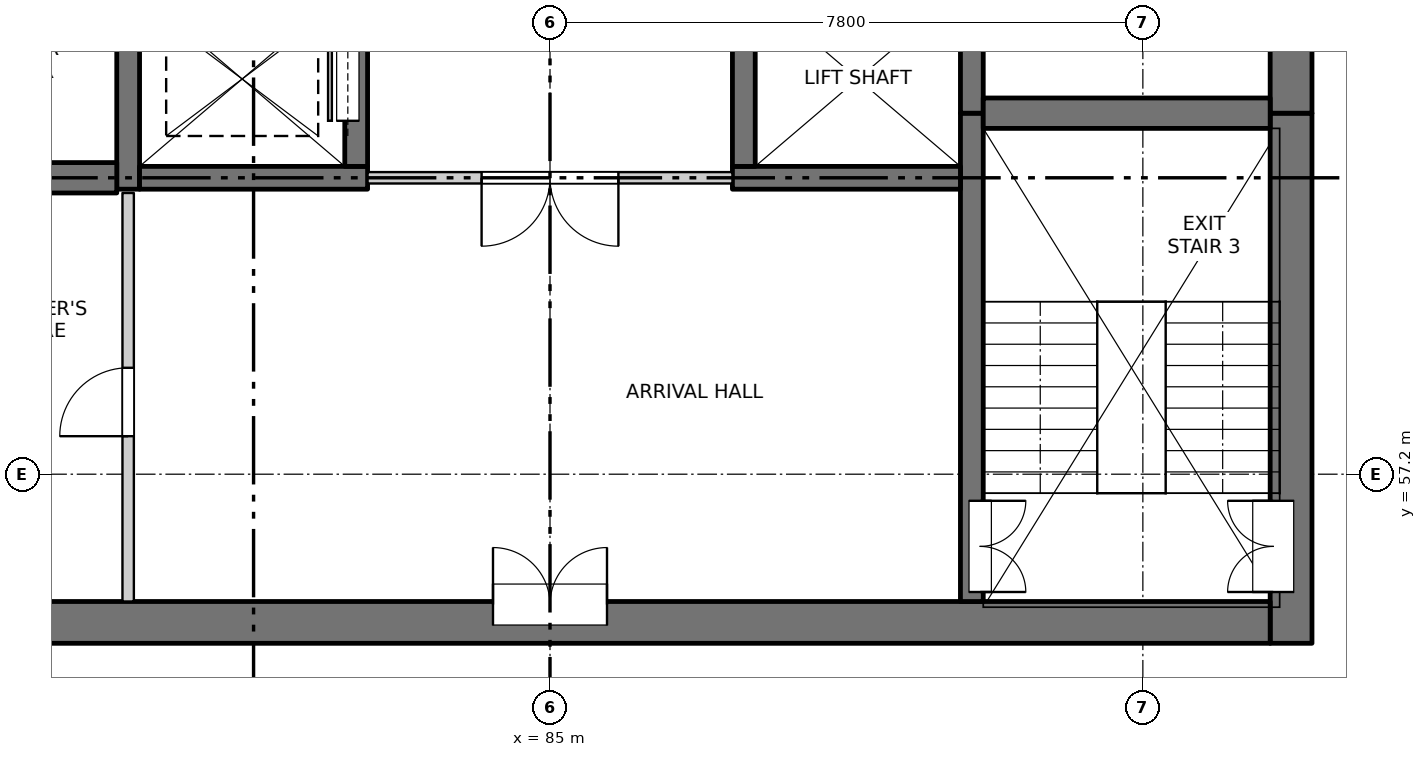
"""IFC4 building model, lengths in metres.
Left out: names, types, materials, properties, quantities, classifications, styles, units other than length and angle.
Written with IfcOpenShell. Run it as: python <this file> out.ifc"""

import sys

from ifc_helpers import new_model, si_unit, direction, frame, frame_2d, origin, place, context, subcontext, project, spatial, rectangle, extrude, element, fill, save


model = new_model("IFC4")
c1 = context("Model", 3, precision=1e-05, world=origin(), true_north=direction((0.0, 1.0)))
c2 = subcontext(c1, "Body", "Model", "MODEL_VIEW")
j1 = project(units=[si_unit("LENGTHUNIT", "METRE"), si_unit("PLANEANGLEUNIT", "RADIAN")], contexts=[c1])
p1 = place(None, origin())
s1 = spatial("IfcSite", under=j1, at=p1, CompositionType="ELEMENT")
p2 = place(p1, origin())
s2 = spatial("IfcBuilding", under=s1, at=p2, CompositionType="ELEMENT")
p3 = place(p2, frame((0.0, 0.0, 99.9)))
s3 = spatial("IfcBuildingStorey", under=s2, at=p3, CompositionType="ELEMENT", Elevation=99.9)
p4 = place(p3, frame((94.75, 54.975, -0.3), z_axis=(0.0, 0.0, 1.0), x_axis=(0.0, 1.0, 0.0)))
e1 = element("IfcWall", 1, at=p4, inside=s3, PredefinedType="SOLIDWALL", context=c2, shape_type="SweptSolid", body=[
    extrude(rectangle(XDim=6.975, YDim=0.55, at=frame_2d((3.487, 0.0))), origin(), (0.0, 0.0, 1.0), 3.45),
])
p5 = place(p4, frame((0.675, 0.0, 0.3)))
e2 = element("IfcOpeningElement", 2, at=p5, cuts=e1, PredefinedType="OPENING", context=c2, shape_type="SweptSolid", body=[
    extrude(rectangle(XDim=1.2, YDim=2.1, at=frame_2d((0.6, 1.05))), frame((0.0, 0.285, 0.0), z_axis=(0.0, -1.0, 0.0), x_axis=(1.0, 0.0, 0.0)), (0.0, 0.0, 1.0), 0.57),
])
p6 = place(p3, frame((94.75, 61.95, -0.3), z_axis=(0.0, 0.0, 1.0), x_axis=(0.0, 1.0, 0.0)))
e3 = element("IfcWall", 3, at=p6, inside=s3, PredefinedType="SOLIDWALL", context=c2, shape_type="SweptSolid", body=[
    extrude(rectangle(XDim=15.35, YDim=0.55, at=frame_2d((7.675, 0.0))), origin(), (0.0, 0.0, 1.0), 3.45),
])
p7 = place(p6, frame((0.925, 0.0, 0.3)))
e4 = element("IfcOpeningElement", 4, at=p7, cuts=e3, PredefinedType="OPENING", context=c2, shape_type="SweptSolid", body=[
    extrude(rectangle(XDim=0.9, YDim=2.1, at=frame_2d((0.45, 1.05))), frame((0.0, 0.285, 0.0), z_axis=(0.0, -1.0, 0.0), x_axis=(1.0, 0.0, 0.0)), (0.0, 0.0, 1.0), 0.57),
])
p8 = place(p6, frame((5.15, 0.0, 0.3)))
e5 = element("IfcOpeningElement", 5, at=p8, cuts=e3, PredefinedType="OPENING", context=c2, shape_type="SweptSolid", body=[
    extrude(rectangle(XDim=0.9, YDim=2.1, at=frame_2d((0.45, 1.05))), frame((0.0, 0.285, 0.0), z_axis=(0.0, -1.0, 0.0), x_axis=(1.0, 0.0, 0.0)), (0.0, 0.0, 1.0), 0.57),
])
p9 = place(p6, frame((9.65, 0.0, 0.3)))
e6 = element("IfcOpeningElement", 6, at=p9, cuts=e3, PredefinedType="OPENING", context=c2, shape_type="SweptSolid", body=[
    extrude(rectangle(XDim=0.9, YDim=2.1, at=frame_2d((0.45, 1.05))), frame((0.0, 0.285, 0.0), z_axis=(0.0, -1.0, 0.0), x_axis=(1.0, 0.0, 0.0)), (0.0, 0.0, 1.0), 0.57),
])
p10 = place(p6, frame((13.1, 0.0, 0.3)))
e7 = element("IfcOpeningElement", 7, at=p10, cuts=e3, PredefinedType="OPENING", context=c2, shape_type="SweptSolid", body=[
    extrude(rectangle(XDim=0.9, YDim=2.1, at=frame_2d((0.45, 1.05))), frame((0.0, 0.285, 0.0), z_axis=(0.0, -1.0, 0.0), x_axis=(1.0, 0.0, 0.0)), (0.0, 0.0, 1.0), 0.57),
])
p11 = place(p3, frame((75.525, 55.25, -0.3), z_axis=(0.0, 0.0, 1.0), x_axis=(1.0, 0.0, 0.0)))
e8 = element("IfcWall", 8, at=p11, inside=s3, PredefinedType="SOLIDWALL", context=c2, shape_type="SweptSolid", body=[
    extrude(rectangle(XDim=18.95, YDim=0.55, at=frame_2d((9.475, 0.0))), origin(), (0.0, 0.0, 1.0), 3.45),
])
p12 = place(p11, frame((8.725, 0.0, 0.3)))
e9 = element("IfcOpeningElement", 9, at=p12, cuts=e8, PredefinedType="OPENING", context=c2, shape_type="SweptSolid", body=[
    extrude(rectangle(XDim=1.5, YDim=2.1, at=frame_2d((0.75, 1.05))), frame((0.0, 0.285, 0.0), z_axis=(0.0, -1.0, 0.0), x_axis=(1.0, 0.0, 0.0)), (0.0, 0.0, 1.0), 0.57),
])
p13 = place(p3, frame((79.45, 60.95, -0.3), z_axis=(0.0, 0.0, 1.0), x_axis=(0.0, 1.0, 0.0)))
e10 = element("IfcWall", 10, at=p13, inside=s3, PredefinedType="SOLIDWALL", context=c2, shape_type="SweptSolid", body=[
    extrude(rectangle(XDim=16.35, YDim=0.3, at=frame_2d((8.175, 0.0))), origin(), (0.0, 0.0, 1.0), 3.45),
])
p14 = place(p3, frame((90.55, 55.525, -0.3), z_axis=(0.0, 0.0, 1.0), x_axis=(0.0, 1.0, 0.0)))
e11 = element("IfcWall", 11, at=p14, inside=s3, PredefinedType="SOLIDWALL", context=c2, shape_type="SweptSolid", body=[
    extrude(rectangle(XDim=6.425, YDim=0.3, at=frame_2d((3.212, 0.0))), origin(), (0.0, 0.0, 1.0), 3.45),
])
p15 = place(p14, frame((0.125, 0.0, 0.3)))
e12 = element("IfcOpeningElement", 12, at=p15, cuts=e11, PredefinedType="OPENING", context=c2, shape_type="SweptSolid", body=[
    extrude(rectangle(XDim=1.2, YDim=2.1, at=frame_2d((0.6, 1.05))), frame((0.0, 0.16, 0.0), z_axis=(0.0, -1.0, 0.0), x_axis=(1.0, 0.0, 0.0)), (0.0, 0.0, 1.0), 0.32),
])
p16 = place(p3, frame((90.55, 61.95, -0.3), z_axis=(0.0, 0.0, 1.0), x_axis=(0.0, 1.0, 0.0)))
e13 = element("IfcWall", 13, at=p16, inside=s3, PredefinedType="SOLIDWALL", context=c2, shape_type="SweptSolid", body=[
    extrude(rectangle(XDim=15.35, YDim=0.3, at=frame_2d((7.675, 0.0))), origin(), (0.0, 0.0, 1.0), 3.45),
])
p17 = place(p3, frame((79.6, 61.1, -0.3), z_axis=(0.0, 0.0, 1.0), x_axis=(1.0, 0.0, 0.0)))
e14 = element("IfcWall", 14, at=p17, inside=s3, PredefinedType="SOLIDWALL", context=c2, shape_type="SweptSolid", body=[
    extrude(rectangle(XDim=3.0, YDim=0.3, at=frame_2d((1.5, 0.0))), origin(), (0.0, 0.0, 1.0), 3.45),
])
p18 = place(p3, frame((82.45, 61.25, -0.3), z_axis=(0.0, 0.0, 1.0), x_axis=(0.0, 1.0, 0.0)))
e15 = element("IfcWall", 15, at=p18, inside=s3, PredefinedType="SOLIDWALL", context=c2, shape_type="SweptSolid", body=[
    extrude(rectangle(XDim=2.3, YDim=0.3, at=frame_2d((1.15, 0.0))), origin(), (0.0, 0.0, 1.0), 3.45),
])
p19 = place(p18, frame((0.6, 0.0, 0.3)))
e16 = element("IfcOpeningElement", 16, at=p19, cuts=e15, PredefinedType="OPENING", context=c2, shape_type="SweptSolid", body=[
    extrude(rectangle(XDim=1.1, YDim=2.1, at=frame_2d((0.55, 1.05))), frame((0.0, 0.16, 0.0), z_axis=(0.0, -1.0, 0.0), x_axis=(1.0, 0.0, 0.0)), (0.0, 0.0, 1.0), 0.32),
])
p20 = place(p3, frame((87.4, 61.1, -0.3), z_axis=(0.0, 0.0, 1.0), x_axis=(1.0, 0.0, 0.0)))
e17 = element("IfcWall", 17, at=p20, inside=s3, PredefinedType="SOLIDWALL", context=c2, shape_type="SweptSolid", body=[
    extrude(rectangle(XDim=3.0, YDim=0.3, at=frame_2d((1.5, 0.0))), origin(), (0.0, 0.0, 1.0), 3.45),
])
p21 = place(p3, frame((87.55, 61.25, -0.3), z_axis=(0.0, 0.0, 1.0), x_axis=(0.0, 1.0, 0.0)))
e18 = element("IfcWall", 18, at=p21, inside=s3, PredefinedType="SOLIDWALL", context=c2, shape_type="SweptSolid", body=[
    extrude(rectangle(XDim=2.3, YDim=0.3, at=frame_2d((1.15, 0.0))), origin(), (0.0, 0.0, 1.0), 3.45),
])
for number, where, z_axis, x_axis in (
    (19, (75.525, 61.1, -0.3), (0.0, 0.0, 1.0), (1.0, 0.0, 0.0)),
    (20, (90.7, 61.95, -0.3), (0.0, 0.0, 1.0), (1.0, 0.0, 0.0)),
):
    element("IfcWall", number, at=place(p3, frame(where, z_axis=z_axis, x_axis=x_axis)), inside=s3, PredefinedType="SOLIDWALL", context=c2, shape_type="SweptSolid", body=[
        extrude(rectangle(XDim=3.775, YDim=0.4, at=frame_2d((1.888, 0.0))), origin(), (0.0, 0.0, 1.0), 3.45),
    ])
p22 = place(p3, frame((82.6, 61.1, 0.0), z_axis=(0.0, 0.0, 1.0), x_axis=(1.0, 0.0, 0.0)))
e21 = element("IfcWall", 21, at=p22, inside=s3, PredefinedType="PARTITIONING", context=c2, shape_type="SweptSolid", body=[
    extrude(rectangle(XDim=4.8, YDim=0.15, at=frame_2d((2.4, 0.0))), origin(), (0.0, 0.0, 1.0), 3.15),
])
p23 = place(p22, frame((1.5, 0.0, 0.0)))
e22 = element("IfcOpeningElement", 22, at=p23, cuts=e21, PredefinedType="OPENING", context=c2, shape_type="SweptSolid", body=[
    extrude(rectangle(XDim=1.8, YDim=2.1, at=frame_2d((0.9, 1.05))), frame((0.0, 0.085, 0.0), z_axis=(0.0, -1.0, 0.0), x_axis=(1.0, 0.0, 0.0)), (0.0, 0.0, 1.0), 0.17),
])
p24 = place(p3, frame((79.45, 55.525, 0.0), z_axis=(0.0, 0.0, 1.0), x_axis=(0.0, 1.0, 0.0)))
e23 = element("IfcWall", 23, at=p24, inside=s3, PredefinedType="PARTITIONING", context=c2, shape_type="SweptSolid", body=[
    extrude(rectangle(XDim=5.375, YDim=0.15, at=frame_2d((2.688, 0.0))), origin(), (0.0, 0.0, 1.0), 3.15),
])
p25 = place(p24, frame((2.175, 0.0, 0.0)))
e24 = element("IfcOpeningElement", 24, at=p25, cuts=e23, PredefinedType="OPENING", context=c2, shape_type="SweptSolid", body=[
    extrude(rectangle(XDim=0.9, YDim=2.1, at=frame_2d((0.45, 1.05))), frame((0.0, 0.085, 0.0), z_axis=(0.0, -1.0, 0.0), x_axis=(1.0, 0.0, 0.0)), (0.0, 0.0, 1.0), 0.17),
])
p26 = place(p12, origin())
e25 = element("IfcDoor", 25, at=p26, inside=s3, OperationType="DOUBLE_DOOR_SINGLE_SWING", PredefinedType="DOOR", context=c2, shape_type="SweptSolid", body=[
    extrude(rectangle(XDim=1.5, YDim=2.1, at=frame_2d((0.75, 1.05))), frame((0.0, 0.26, 0.0), z_axis=(0.0, -1.0, 0.0), x_axis=(1.0, 0.0, 0.0)), (0.0, 0.0, 1.0), 0.05),
])
fill(e9, e25)
p27 = place(p15, origin())
e26 = element("IfcDoor", 26, at=p27, inside=s3, OperationType="DOUBLE_DOOR_SINGLE_SWING", PredefinedType="DOOR", context=c2, shape_type="SweptSolid", body=[
    extrude(rectangle(XDim=1.2, YDim=2.1, at=frame_2d((0.6, 1.05))), frame((0.0, -0.085, 0.0), z_axis=(0.0, -1.0, 0.0), x_axis=(1.0, 0.0, 0.0)), (0.0, 0.0, 1.0), 0.05),
])
fill(e12, e26)
p28 = place(p5, origin())
e27 = element("IfcDoor", 27, at=p28, inside=s3, OperationType="DOUBLE_DOOR_SINGLE_SWING", PredefinedType="DOOR", context=c2, shape_type="SweptSolid", body=[
    extrude(rectangle(XDim=1.2, YDim=2.1, at=frame_2d((0.6, 1.05))), frame((0.0, 0.26, 0.0), z_axis=(0.0, -1.0, 0.0), x_axis=(1.0, 0.0, 0.0)), (0.0, 0.0, 1.0), 0.05),
])
fill(e2, e27)
p29 = place(p25, origin())
e28 = element("IfcDoor", 28, at=p29, inside=s3, OperationType="SINGLE_SWING_LEFT", PredefinedType="DOOR", context=c2, shape_type="SweptSolid", body=[
    extrude(rectangle(XDim=0.9, YDim=2.1, at=frame_2d((0.45, 1.05))), frame((0.0, 0.025, 0.0), z_axis=(0.0, -1.0, 0.0), x_axis=(1.0, 0.0, 0.0)), (0.0, 0.0, 1.0), 0.05),
])
fill(e24, e28)
p30 = place(p23, origin())
e29 = element("IfcDoor", 29, at=p30, inside=s3, OperationType="DOUBLE_DOOR_SINGLE_SWING", PredefinedType="DOOR", context=c2, shape_type="SweptSolid", body=[
    extrude(rectangle(XDim=1.8, YDim=2.1, at=frame_2d((0.9, 1.05))), frame((0.0, 0.025, 0.0), z_axis=(0.0, -1.0, 0.0), x_axis=(1.0, 0.0, 0.0)), (0.0, 0.0, 1.0), 0.05),
])
fill(e22, e29)
p31 = place(p19, origin())
e30 = element("IfcDoor", 30, at=p31, inside=s3, OperationType="SLIDING_TO_RIGHT", PredefinedType="DOOR", context=c2, shape_type="SweptSolid", body=[
    extrude(rectangle(XDim=1.1, YDim=2.1, at=frame_2d((0.55, 1.05))), frame((0.0, 0.135, 0.0), z_axis=(0.0, -1.0, 0.0), x_axis=(1.0, 0.0, 0.0)), (0.0, 0.0, 1.0), 0.05),
])
fill(e16, e30)
save(model, sys.argv[1])
